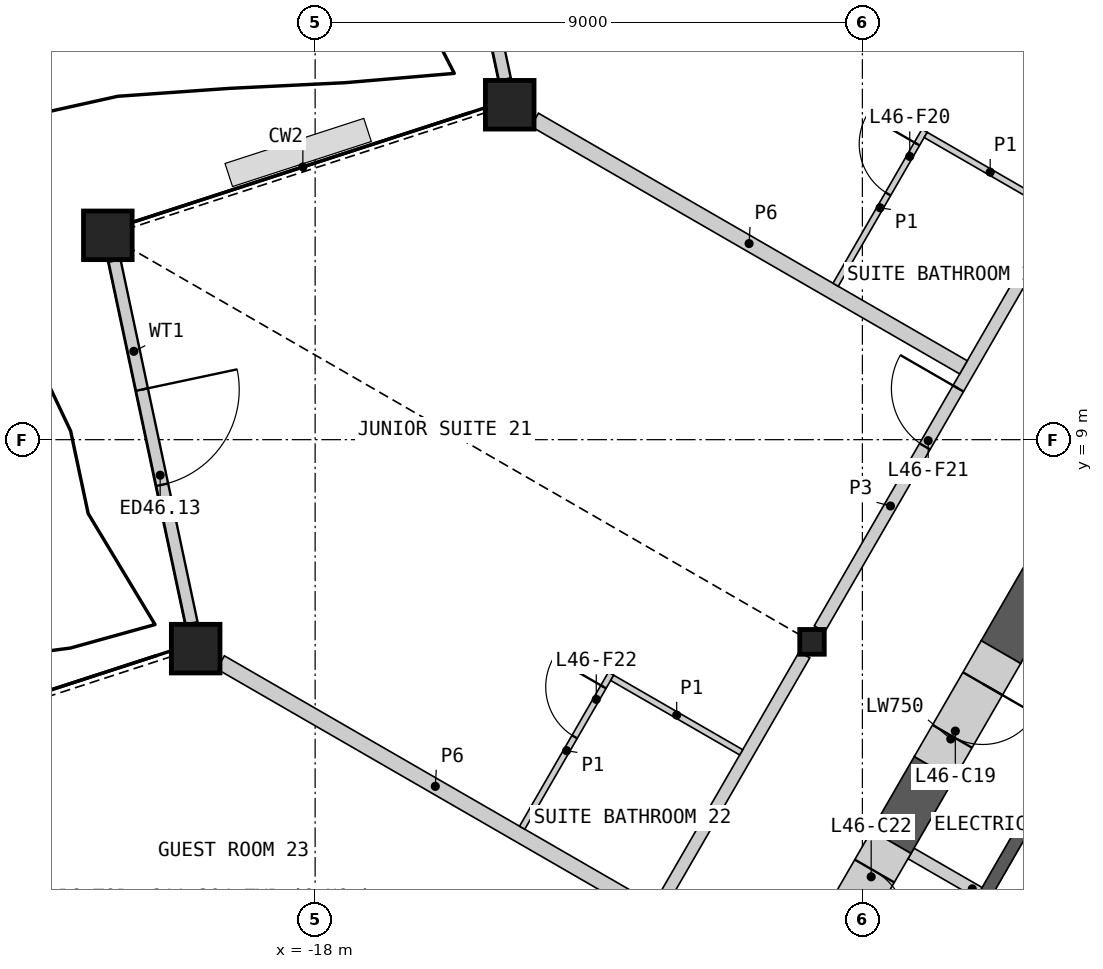
"""IFC4 building model, lengths in metres.
Left out: names, types, materials, properties, quantities, classifications, styles, units other than length and angle.
Written with IfcOpenShell. Run it as: python <this file> out.ifc"""

import sys

from ifc_helpers import new_model, si_unit, direction, frame, frame_2d, origin, origin_2d, place, context, subcontext, project, spatial, polyline, rectangle, hollow_rectangle, i_section, outline, extrude, element, fill, save


model = new_model("IFC4")
c1 = context("Model", 3, precision=1e-05, world=origin(), true_north=direction((0.0, 1.0)))
c2 = subcontext(c1, "Body", "Model", "MODEL_VIEW")
j1 = project(units=[si_unit("LENGTHUNIT", "METRE"), si_unit("PLANEANGLEUNIT", "RADIAN")], contexts=[c1])
p1 = place(None, origin())
s1 = spatial("IfcSite", under=j1, at=p1, CompositionType="ELEMENT")
p2 = place(p1, origin())
s2 = spatial("IfcBuilding", under=s1, at=p2, CompositionType="ELEMENT")
p3 = place(p2, frame((0.0, 0.0, 208.8)))
s3 = spatial("IfcBuildingStorey", under=s2, at=p3, CompositionType="ELEMENT", Elevation=208.8)
for number, where, z_axis, x_axis in (
    (1, (-14.8, 14.508, 0.0), (0.0, 0.0, 1.0), (1.0, 0.0, 0.0)),
    (2, (-21.409, 12.361, 0.0), (0.0, 0.0, 1.0), (1.0, 0.0, 0.0)),
    (3, (-19.965, 5.563, 0.0), (0.0, 0.0, 1.0), (1.0, 0.0, 0.0)),
):
    element("IfcColumn", number, at=place(p3, frame(where, z_axis=z_axis, x_axis=x_axis)), inside=s3, PredefinedType="COLUMN", context=c2, shape_type="SweptSolid", body=[
        extrude(hollow_rectangle(XDim=0.8, YDim=0.8, WallThickness=0.05, at=origin_2d()), origin(), (0.0, 0.0, 1.0), 3.6),
    ])
p4 = place(p3, frame((-9.828, 5.675, 0.0), z_axis=(0.0, 0.0, 1.0), x_axis=(1.0, 0.0, 0.0)))
e4 = element("IfcColumn", 4, at=p4, inside=s3, PredefinedType="COLUMN", context=c2, shape_type="SweptSolid", body=[
    extrude(i_section(OverallWidth=0.404, OverallDepth=0.407, WebThickness=0.027, FlangeThickness=0.044, at=origin_2d()), origin(), (0.0, 0.0, 1.0), 3.6),
])
p5 = place(p3, frame((-16.146, 20.89, 0.0), z_axis=(0.0, 0.0, 1.0), x_axis=(0.207912864597, -0.978147351238, 0.0)))
e5 = element("IfcWall", 5, at=p5, inside=s3, PredefinedType="SOLIDWALL", context=c2, shape_type="SweptSolid", body=[
    extrude(rectangle(XDim=6.098, YDim=0.2, at=frame_2d((3.049, 0.0))), origin(), (0.0, 0.0, 1.0), 2.701),
])
p6 = place(p5, frame((2.184, 0.0, 0.0)))
e6 = element("IfcOpeningElement", 6, at=p6, cuts=e5, PredefinedType="OPENING", context=c2, shape_type="SweptSolid", body=[
    extrude(rectangle(XDim=1.6, YDim=2.4, at=frame_2d((0.8, 1.2))), frame((0.0, 0.11, 0.0), z_axis=(0.0, -1.0, 0.0), x_axis=(1.0, 0.0, 0.0)), (0.0, 0.0, 1.0), 0.22),
])
p7 = place(p3, frame((-21.299, 11.944, 0.0), z_axis=(0.0, 0.0, 1.0), x_axis=(0.207912864597, -0.978147351238, 0.0)))
e7 = element("IfcWall", 7, at=p7, inside=s3, PredefinedType="SOLIDWALL", context=c2, shape_type="SweptSolid", body=[
    extrude(rectangle(XDim=6.098, YDim=0.2, at=frame_2d((3.049, 0.0))), origin(), (0.0, 0.0, 1.0), 2.701),
])
p8 = place(p7, frame((2.168, 0.0, 0.0)))
e8 = element("IfcOpeningElement", 8, at=p8, cuts=e7, PredefinedType="OPENING", context=c2, shape_type="SweptSolid", body=[
    extrude(rectangle(XDim=1.6, YDim=2.4, at=frame_2d((0.8, 1.2))), frame((0.0, 0.11, 0.0), z_axis=(0.0, -1.0, 0.0), x_axis=(1.0, 0.0, 0.0)), (0.0, 0.0, 1.0), 0.22),
])
p9 = place(p3, origin())
e9 = element("IfcWall", 9, at=p9, inside=s3, PredefinedType="SHEAR", context=c2, shape_type="SweptSolid", body=[
    extrude(outline(polyline([(-4.96, 0.208), (-7.131, 1.461), (-3.731, 7.35), (-1.561, 6.097), (-1.66, 5.924), (-3.652, 7.074), (-4.652, 5.342), (-2.66, 4.192), (-2.76, 4.019), (-4.752, 5.169), (-5.752, 3.437), (-3.76, 2.287), (-3.861, 2.113), (-5.852, 3.263), (-6.852, 1.531), (-4.861, 0.381), (-4.96, 0.208)])), origin(), (0.0, 0.0, 1.0), 3.25),
])
p10 = place(p3, frame((-7.081, 1.548, 0.0), z_axis=(0.0, 0.0, 1.0), x_axis=(-0.866003189247, 0.500038474733, 0.0)))
e10 = element("IfcWall", 10, at=p10, inside=s3, PredefinedType="SHEAR", context=c2, shape_type="SweptSolid", body=[
    extrude(rectangle(XDim=1.293, YDim=0.2, at=frame_2d((0.646, 0.0))), origin(), (0.0, 0.0, 1.0), 3.25),
])
p11 = place(p3, frame((-3.708, 10.724, 0.0), z_axis=(0.0, 0.0, 1.0), x_axis=(-0.500021737671, -0.866012853171, 0.0)))
e11 = element("IfcWall", 11, at=p11, inside=s3, PredefinedType="SHEAR", context=c2, shape_type="SweptSolid", body=[
    extrude(rectangle(XDim=6.026, YDim=0.75, at=frame_2d((3.013, 0.0))), origin(), (0.0, 0.0, 1.0), 3.25),
])
p12 = place(p3, frame((-7.821, 3.601, 0.0), z_axis=(0.0, 0.0, 1.0), x_axis=(-0.49996263964, -0.866046972724, 0.0)))
e12 = element("IfcWall", 12, at=p12, inside=s3, PredefinedType="SHEAR", context=c2, shape_type="SweptSolid", body=[
    extrude(rectangle(XDim=1.408, YDim=0.75, at=frame_2d((0.704, 0.0))), origin(), (0.0, 0.0, 1.0), 3.25),
])
p13 = place(p3, frame((-6.721, 5.506, 0.0), z_axis=(0.0, 0.0, 1.0), x_axis=(-0.499946605688, -0.86605622881, 0.0)))
e13 = element("IfcWall", 13, at=p13, inside=s3, PredefinedType="SHEAR", context=c2, shape_type="SweptSolid", body=[
    extrude(rectangle(XDim=2.2, YDim=0.75, at=frame_2d((1.1, 0.0))), origin(), (0.0, 0.0, 1.0), 3.25),
])
p14 = place(p13, frame((0.6, 0.0, 0.0)))
e14 = element("IfcOpeningElement", 14, at=p14, cuts=e13, PredefinedType="OPENING", context=c2, shape_type="SweptSolid", body=[
    extrude(rectangle(XDim=1.0, YDim=2.1, at=frame_2d((0.5, 1.05))), frame((0.0, 0.385, 0.0), z_axis=(0.0, -1.0, 0.0), x_axis=(1.0, 0.0, 0.0)), (0.0, 0.0, 1.0), 0.77),
])
p15 = place(p3, frame((-8.525, 2.382, 0.0), z_axis=(0.0, 0.0, 1.0), x_axis=(-0.500077893725, -0.86598042715, 0.0)))
e15 = element("IfcWall", 15, at=p15, inside=s3, PredefinedType="SHEAR", context=c2, shape_type="SweptSolid", body=[
    extrude(rectangle(XDim=2.2, YDim=0.75, at=frame_2d((1.1, 0.0))), origin(), (0.0, 0.0, 1.0), 3.25),
])
p16 = place(p15, frame((0.55, 0.0, 0.0)))
e16 = element("IfcOpeningElement", 16, at=p16, cuts=e15, PredefinedType="OPENING", context=c2, shape_type="SweptSolid", body=[
    extrude(rectangle(XDim=1.1, YDim=2.1, at=frame_2d((0.55, 1.05))), frame((0.0, 0.385, 0.0), z_axis=(0.0, -1.0, 0.0), x_axis=(1.0, 0.0, 0.0)), (0.0, 0.0, 1.0), 0.77),
])
p17 = place(p3, frame((-26.164, 3.199, 0.0), z_axis=(0.0, 0.0, 1.0), x_axis=(0.866029635251, -0.499992670813, 0.0)))
e17 = element("IfcWall", 17, at=p17, inside=s3, PredefinedType="PARTITIONING", context=c2, shape_type="SweptSolid", body=[
    extrude(rectangle(XDim=13.035, YDim=0.25, at=frame_2d((6.518, 0.0))), origin(), (0.0, 0.0, 1.0), 2.404),
])
p18 = place(p3, frame((-9.705, 5.888, 0.0), z_axis=(0.0, 0.0, 1.0), x_axis=(0.50000393355, 0.866023132736, 0.0)))
e18 = element("IfcWall", 18, at=p18, inside=s3, PredefinedType="PARTITIONING", context=c2, shape_type="SweptSolid", body=[
    extrude(rectangle(XDim=9.335, YDim=0.2, at=frame_2d((4.667, 0.0))), origin(), (0.0, 0.0, 1.0), 3.25),
])
p19 = place(p18, frame((3.465, 0.0, 0.0)))
e19 = element("IfcOpeningElement", 19, at=p19, cuts=e18, PredefinedType="OPENING", context=c2, shape_type="SweptSolid", body=[
    extrude(rectangle(XDim=1.1, YDim=2.1, at=frame_2d((0.55, 1.05))), frame((0.0, 0.11, 0.0), z_axis=(0.0, -1.0, 0.0), x_axis=(1.0, 0.0, 0.0)), (0.0, 0.0, 1.0), 0.22),
])
p20 = place(p3, frame((-14.619, -2.624, 0.0), z_axis=(0.0, 0.0, 1.0), x_axis=(0.50000393355, 0.866023132736, 0.0)))
e20 = element("IfcWall", 20, at=p20, inside=s3, PredefinedType="PARTITIONING", context=c2, shape_type="SweptSolid", body=[
    extrude(rectangle(XDim=9.335, YDim=0.2, at=frame_2d((4.667, 0.0))), origin(), (0.0, 0.0, 1.0), 3.25),
])
p21 = place(p20, frame((3.062, 0.0, 0.0)))
e21 = element("IfcOpeningElement", 21, at=p21, cuts=e20, PredefinedType="OPENING", context=c2, shape_type="SweptSolid", body=[
    extrude(rectangle(XDim=1.0, YDim=2.1, at=frame_2d((0.5, 1.05))), frame((0.0, 0.11, 0.0), z_axis=(0.0, -1.0, 0.0), x_axis=(1.0, 0.0, 0.0)), (0.0, 0.0, 1.0), 0.22),
])
p22 = place(p3, frame((-19.555, 5.337, 0.0), z_axis=(0.0, 0.0, 1.0), x_axis=(0.866023543838, -0.500003221507, 0.0)))
e22 = element("IfcWall", 22, at=p22, inside=s3, PredefinedType="PARTITIONING", context=c2, shape_type="SweptSolid", body=[
    extrude(rectangle(XDim=8.154, YDim=0.25, at=frame_2d((4.077, 0.0))), origin(), (0.0, 0.0, 1.0), 2.404),
])
p23 = place(p3, frame((-14.39, 14.261, 0.0), z_axis=(0.0, 0.0, 1.0), x_axis=(0.86603182394, -0.4999888798, 0.0)))
e23 = element("IfcWall", 23, at=p23, inside=s3, PredefinedType="PARTITIONING", context=c2, shape_type="SweptSolid", body=[
    extrude(rectangle(XDim=8.144, YDim=0.25, at=frame_2d((4.072, 0.0))), origin(), (0.0, 0.0, 1.0), 2.404),
])
p24 = place(p3, frame((-14.595, 2.618, 0.0), z_axis=(0.0, 0.0, 1.0), x_axis=(0.500062034277, 0.865989585315, 0.0)))
e24 = element("IfcWall", 24, at=p24, inside=s3, PredefinedType="PARTITIONING", context=c2, shape_type="SweptSolid", body=[
    extrude(rectangle(XDim=2.925, YDim=0.1, at=frame_2d((1.462, 0.0))), origin(), (0.0, 0.0, 1.0), 2.404),
])
p25 = place(p24, frame((1.725, 0.0, 0.0)))
e25 = element("IfcOpeningElement", 25, at=p25, cuts=e24, PredefinedType="OPENING", context=c2, shape_type="SweptSolid", body=[
    extrude(rectangle(XDim=0.95, YDim=2.1, at=frame_2d((0.475, 1.05))), frame((0.0, 0.06, 0.0), z_axis=(0.0, -1.0, 0.0), x_axis=(1.0, 0.0, 0.0)), (0.0, 0.0, 1.0), 0.12),
])
p26 = place(p3, frame((-9.44, 11.548, 0.0), z_axis=(0.0, 0.0, 1.0), x_axis=(0.499963291492, 0.866046596414, 0.0)))
e26 = element("IfcWall", 26, at=p26, inside=s3, PredefinedType="PARTITIONING", context=c2, shape_type="SweptSolid", body=[
    extrude(rectangle(XDim=2.925, YDim=0.1, at=frame_2d((1.462, 0.0))), origin(), (0.0, 0.0, 1.0), 2.404),
])
p27 = place(p26, frame((1.725, 0.0, 0.0)))
e27 = element("IfcOpeningElement", 27, at=p27, cuts=e26, PredefinedType="OPENING", context=c2, shape_type="SweptSolid", body=[
    extrude(rectangle(XDim=0.95, YDim=2.1, at=frame_2d((0.475, 1.05))), frame((0.0, 0.06, 0.0), z_axis=(0.0, -1.0, 0.0), x_axis=(1.0, 0.0, 0.0)), (0.0, 0.0, 1.0), 0.12),
])
p28 = place(p3, frame((-13.115, 5.083, 0.0), z_axis=(0.0, 0.0, 1.0), x_axis=(0.866032905446, -0.499987006516, 0.0)))
e28 = element("IfcWall", 28, at=p28, inside=s3, PredefinedType="PARTITIONING", context=c2, shape_type="SweptSolid", body=[
    extrude(rectangle(XDim=2.45, YDim=0.1, at=frame_2d((1.225, 0.0))), origin(), (0.0, 0.0, 1.0), 2.404),
])
p29 = place(p3, frame((-7.959, 14.012, 0.0), z_axis=(0.0, 0.0, 1.0), x_axis=(0.866057815567, -0.499943856944, 0.0)))
e29 = element("IfcWall", 29, at=p29, inside=s3, PredefinedType="PARTITIONING", context=c2, shape_type="SweptSolid", body=[
    extrude(rectangle(XDim=2.45, YDim=0.1, at=frame_2d((1.225, 0.0))), origin(), (0.0, 0.0, 1.0), 2.404),
])
p30 = place(p8, origin())
e30 = element("IfcDoor", 30, at=p30, inside=s3, OperationType="DOUBLE_DOOR_SINGLE_SWING", PredefinedType="DOOR", context=c2, shape_type="SweptSolid", body=[
    extrude(rectangle(XDim=1.6, YDim=2.4, at=frame_2d((0.8, 1.2))), frame((0.0, 0.025, 0.0), z_axis=(0.0, -1.0, 0.0), x_axis=(1.0, 0.0, 0.0)), (0.0, 0.0, 1.0), 0.05),
])
fill(e8, e30)
p31 = place(p14, origin())
e31 = element("IfcDoor", 31, at=p31, inside=s3, OperationType="SINGLE_SWING_LEFT", PredefinedType="DOOR", context=c2, shape_type="SweptSolid", body=[
    extrude(rectangle(XDim=1.0, YDim=2.1, at=frame_2d((0.5, 1.05))), frame((0.0, 0.13, 0.0), z_axis=(0.0, -1.0, 0.0), x_axis=(1.0, 0.0, 0.0)), (0.0, 0.0, 1.0), 0.05),
])
fill(e14, e31)
p32 = place(p16, origin())
e32 = element("IfcDoor", 32, at=p32, inside=s3, OperationType="SINGLE_SWING_RIGHT", PredefinedType="DOOR", context=c2, shape_type="SweptSolid", body=[
    extrude(rectangle(XDim=1.1, YDim=2.1, at=frame_2d((0.55, 1.05))), frame((0.0, 0.13, 0.0), z_axis=(0.0, -1.0, 0.0), x_axis=(1.0, 0.0, 0.0)), (0.0, 0.0, 1.0), 0.05),
])
fill(e16, e32)
p33 = place(p27, origin())
e33 = element("IfcDoor", 33, at=p33, inside=s3, OperationType="SINGLE_SWING_RIGHT", PredefinedType="DOOR", context=c2, shape_type="SweptSolid", body=[
    extrude(rectangle(XDim=0.95, YDim=2.1, at=frame_2d((0.475, 1.05))), frame((0.0, 0.025, 0.0), z_axis=(0.0, -1.0, 0.0), x_axis=(1.0, 0.0, 0.0)), (0.0, 0.0, 1.0), 0.05),
])
fill(e27, e33)
p34 = place(p19, origin())
e34 = element("IfcDoor", 34, at=p34, inside=s3, OperationType="SINGLE_SWING_RIGHT", PredefinedType="DOOR", context=c2, shape_type="SweptSolid", body=[
    extrude(rectangle(XDim=1.1, YDim=2.1, at=frame_2d((0.55, 1.05))), frame((0.0, 0.025, 0.0), z_axis=(0.0, -1.0, 0.0), x_axis=(1.0, 0.0, 0.0)), (0.0, 0.0, 1.0), 0.05),
])
fill(e19, e34)
p35 = place(p25, origin())
e35 = element("IfcDoor", 35, at=p35, inside=s3, OperationType="SINGLE_SWING_RIGHT", PredefinedType="DOOR", context=c2, shape_type="SweptSolid", body=[
    extrude(rectangle(XDim=0.95, YDim=2.1, at=frame_2d((0.475, 1.05))), frame((0.0, 0.025, 0.0), z_axis=(0.0, -1.0, 0.0), x_axis=(1.0, 0.0, 0.0)), (0.0, 0.0, 1.0), 0.05),
])
fill(e25, e35)
save(model, sys.argv[1])
